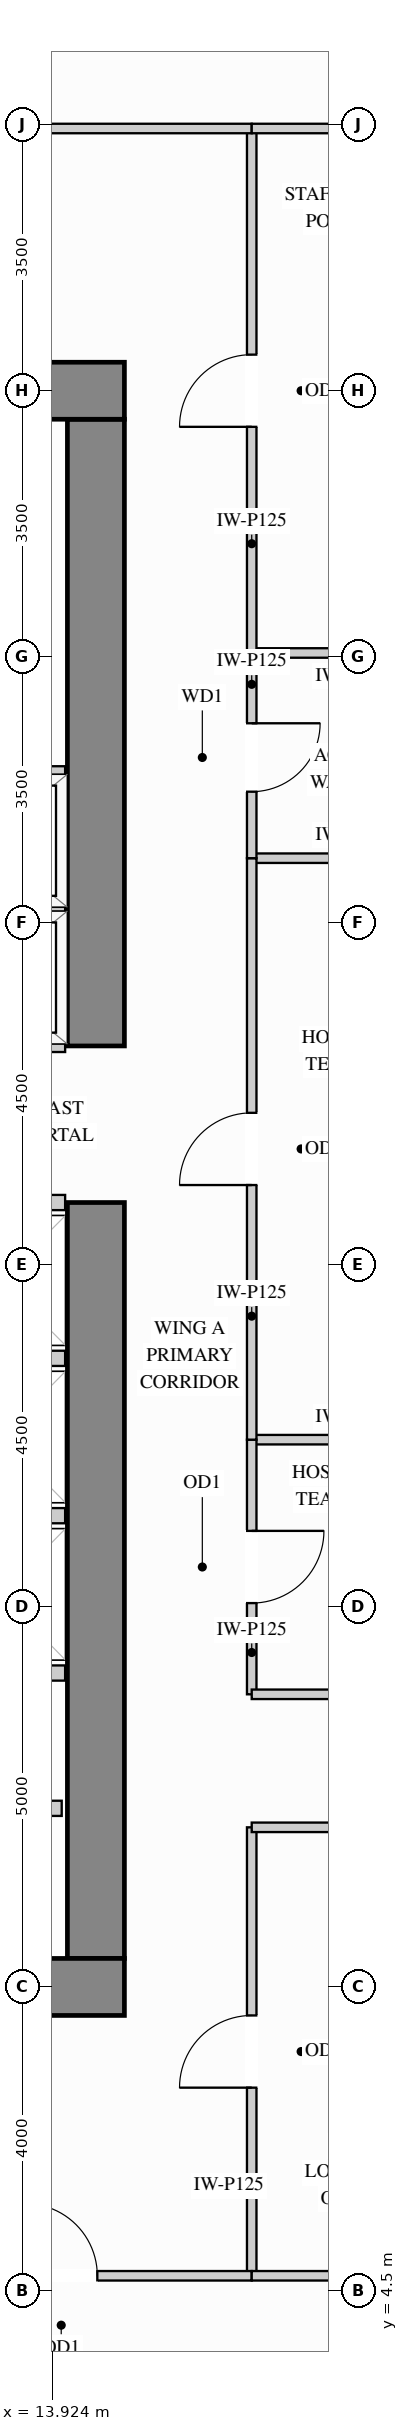
"""IFC4 building model, lengths in metres.
Left out: names, types, materials, properties, quantities, classifications, styles, units other than length and angle.
Written with IfcOpenShell. Run it as: python <this file> out.ifc"""

import sys

from ifc_helpers import new_model, si_unit, direction, frame, frame_2d, origin, place, context, subcontext, project, spatial, rectangle, extrude, source, transform, mapped, element, fill, save


model = new_model("IFC4")
c1 = context("Model", 3, precision=1e-05, world=origin(), true_north=direction((0.0, 1.0)))
c2 = subcontext(c1, "Body", "Model", "MODEL_VIEW")
j1 = project(units=[si_unit("LENGTHUNIT", "METRE"), si_unit("PLANEANGLEUNIT", "RADIAN")], contexts=[c1])
p1 = place(None, origin())
s1 = spatial("IfcSite", under=j1, at=p1, CompositionType="ELEMENT")
p2 = place(p1, origin())
s2 = spatial("IfcBuilding", under=s1, at=p2, CompositionType="ELEMENT")
p3 = place(p2, frame((0.0, 0.0, 124.2)))
s3 = spatial("IfcBuildingStorey", under=s2, at=p3, CompositionType="ELEMENT", Elevation=124.2)
m1 = source(origin(), c2, "Body", "SweptSolid", [
    extrude(rectangle(XDim=9.945, YDim=0.75, at=frame_2d((4.973, 0.0))), origin(), (0.0, 0.0, 1.0), 3.38),
])
p4 = place(p3, frame((14.5, 8.875, 0.0), z_axis=(0.0, 0.0, 1.0), x_axis=(0.0, 1.0, 0.0)))
e1 = element("IfcWall", 1, at=p4, inside=s3, PredefinedType="SHEAR", context=c2, shape_type="MappedRepresentation", body=[
    mapped(m1, transform((0.0, 0.0, 0.0), x_axis=(1.0, 0.0, 0.0), y_axis=(0.0, 1.0, 0.0), z_axis=(0.0, 0.0, 1.0))),
])
m2 = source(origin(), c2, "Body", "SweptSolid", [
    extrude(rectangle(XDim=8.245, YDim=0.75, at=frame_2d((4.123, 0.0))), origin(), (0.0, 0.0, 1.0), 3.38),
])
p5 = place(p3, frame((14.5, 20.88, 0.0), z_axis=(0.0, 0.0, 1.0), x_axis=(0.0, 1.0, 0.0)))
e2 = element("IfcWall", 2, at=p5, inside=s3, PredefinedType="SHEAR", context=c2, shape_type="MappedRepresentation", body=[
    mapped(m2, transform((0.0, 0.0, 0.0), x_axis=(1.0, 0.0, 0.0), y_axis=(0.0, 1.0, 0.0), z_axis=(0.0, 0.0, 1.0))),
])
m3 = source(origin(), c2, "Body", "SweptSolid", [
    extrude(rectangle(XDim=10.75, YDim=0.75, at=frame_2d((5.375, 0.0))), origin(), (0.0, 0.0, 1.0), 3.38),
])
for number, where, z_axis, x_axis in (
    (3, (4.125, 29.5, 0.0), (0.0, 0.0, 1.0), (1.0, 0.0, 0.0)),
    (4, (4.125, 8.5, 0.0), (0.0, 0.0, 1.0), (1.0, 0.0, 0.0)),
):
    element("IfcWall", number, at=place(p3, frame(where, z_axis=z_axis, x_axis=x_axis)), inside=s3, PredefinedType="SHEAR", context=c2, shape_type="MappedRepresentation", body=[
        mapped(m3, transform((0.0, 0.0, 0.0), x_axis=(1.0, 0.0, 0.0), y_axis=(0.0, 1.0, 0.0), z_axis=(0.0, 0.0, 1.0))),
    ])
m4 = source(origin(), c2, "Body", "SweptSolid", [
    extrude(rectangle(XDim=2.6, YDim=0.125, at=frame_2d((1.3, 0.0))), origin(), (0.0, 0.0, 1.0), 3.365),
])
p6 = place(p3, frame((16.55, 15.7, 0.0), z_axis=(0.0, 0.0, 1.0), x_axis=(1.0, 0.0, 0.0)))
e5 = element("IfcWall", 5, at=p6, inside=s3, PredefinedType="PARTITIONING", context=c2, shape_type="MappedRepresentation", body=[
    mapped(m4, transform((0.0, 0.0, 0.0), x_axis=(1.0, 0.0, 0.0), y_axis=(0.0, 1.0, 0.0), z_axis=(0.0, 0.0, 1.0))),
])
m5 = source(origin(), c2, "Body", "SweptSolid", [
    extrude(rectangle(XDim=2.598, YDim=0.125, at=frame_2d((1.299, 0.0))), origin(), (0.0, 0.0, 1.0), 3.365),
])
for number, where, z_axis, x_axis in (
    (6, (16.55, 23.35, 0.0), (0.0, 0.0, 1.0), (1.0, 0.0, 0.0)),
    (7, (16.55, 26.05, 0.0), (0.0, 0.0, 1.0), (1.0, 0.0, 0.0)),
):
    element("IfcWall", number, at=place(p3, frame(where, z_axis=z_axis, x_axis=x_axis)), inside=s3, PredefinedType="PARTITIONING", context=c2, shape_type="MappedRepresentation", body=[
        mapped(m5, transform((0.0, 0.0, 0.0), x_axis=(1.0, 0.0, 0.0), y_axis=(0.0, 1.0, 0.0), z_axis=(0.0, 0.0, 1.0))),
    ])
p7 = place(p3, frame((16.55, 12.35, 0.0), z_axis=(0.0, 0.0, 1.0), x_axis=(0.0, 1.0, 0.0)))
e8 = element("IfcWall", 8, at=p7, inside=s3, PredefinedType="PARTITIONING", context=c2, shape_type="SweptSolid", body=[
    extrude(rectangle(XDim=3.35, YDim=0.125, at=frame_2d((1.675, 0.0))), origin(), (0.0, 0.0, 1.0), 3.365),
])
p8 = place(p7, frame((1.2, 0.0, 0.0)))
e9 = element("IfcOpeningElement", 9, at=p8, cuts=e8, PredefinedType="OPENING", context=c2, shape_type="SweptSolid", body=[
    extrude(rectangle(XDim=0.95, YDim=2.15, at=frame_2d((0.475, 1.075))), frame((0.0, 0.073, 0.0), z_axis=(0.0, -1.0, 0.0), x_axis=(1.0, 0.0, 0.0)), (0.0, 0.0, 1.0), 0.145),
])
p9 = place(p3, frame((16.55, 15.7, 0.0), z_axis=(0.0, 0.0, 1.0), x_axis=(0.0, 1.0, 0.0)))
e10 = element("IfcWall", 10, at=p9, inside=s3, PredefinedType="PARTITIONING", context=c2, shape_type="SweptSolid", body=[
    extrude(rectangle(XDim=7.65, YDim=0.125, at=frame_2d((3.825, 0.0))), origin(), (0.0, 0.0, 1.0), 3.365),
])
p10 = place(p9, frame((3.35, 0.0, 0.0)))
e11 = element("IfcOpeningElement", 11, at=p10, cuts=e10, PredefinedType="OPENING", context=c2, shape_type="SweptSolid", body=[
    extrude(rectangle(XDim=0.95, YDim=2.15, at=frame_2d((0.475, 1.075))), frame((0.0, 0.073, 0.0), z_axis=(0.0, -1.0, 0.0), x_axis=(1.0, 0.0, 0.0)), (0.0, 0.0, 1.0), 0.145),
])
p11 = place(p3, frame((16.55, 26.05, 0.0), z_axis=(0.0, 0.0, 1.0), x_axis=(0.0, 1.0, 0.0)))
e12 = element("IfcWall", 12, at=p11, inside=s3, PredefinedType="PARTITIONING", context=c2, shape_type="SweptSolid", body=[
    extrude(rectangle(XDim=6.9, YDim=0.125, at=frame_2d((3.45, 0.0))), origin(), (0.0, 0.0, 1.0), 3.365),
])
p12 = place(p11, frame((2.975, 0.0, 0.0)))
e13 = element("IfcOpeningElement", 13, at=p12, cuts=e12, PredefinedType="OPENING", context=c2, shape_type="SweptSolid", body=[
    extrude(rectangle(XDim=0.95, YDim=2.15, at=frame_2d((0.475, 1.075))), frame((0.0, 0.073, 0.0), z_axis=(0.0, -1.0, 0.0), x_axis=(1.0, 0.0, 0.0)), (0.0, 0.0, 1.0), 0.145),
])
p13 = place(p3, frame((16.55, 4.7, 0.0), z_axis=(0.0, 0.0, 1.0), x_axis=(0.0, 1.0, 0.0)))
e14 = element("IfcWall", 14, at=p13, inside=s3, PredefinedType="PARTITIONING", context=c2, shape_type="SweptSolid", body=[
    extrude(rectangle(XDim=5.9, YDim=0.125, at=frame_2d((2.95, 0.0))), origin(), (0.0, 0.0, 1.0), 3.365),
])
p14 = place(p13, frame((2.475, 0.0, 0.0)))
e15 = element("IfcOpeningElement", 15, at=p14, cuts=e14, PredefinedType="OPENING", context=c2, shape_type="SweptSolid", body=[
    extrude(rectangle(XDim=0.95, YDim=2.15, at=frame_2d((0.475, 1.075))), frame((0.0, 0.073, 0.0), z_axis=(0.0, -1.0, 0.0), x_axis=(1.0, 0.0, 0.0)), (0.0, 0.0, 1.0), 0.145),
])
p15 = place(p3, frame((16.55, 23.35, 0.0), z_axis=(0.0, 0.0, 1.0), x_axis=(0.0, 1.0, 0.0)))
e16 = element("IfcWall", 16, at=p15, inside=s3, PredefinedType="PARTITIONING", context=c2, shape_type="SweptSolid", body=[
    extrude(rectangle(XDim=2.7, YDim=0.125, at=frame_2d((1.35, 0.0))), origin(), (0.0, 0.0, 1.0), 3.365),
])
p16 = place(p15, frame((0.875, 0.0, 0.0)))
e17 = element("IfcOpeningElement", 17, at=p16, cuts=e16, PredefinedType="OPENING", context=c2, shape_type="SweptSolid", body=[
    extrude(rectangle(XDim=0.9, YDim=2.15, at=frame_2d((0.45, 1.075))), frame((0.0, 0.073, 0.0), z_axis=(0.0, -1.0, 0.0), x_axis=(1.0, 0.0, 0.0)), (0.0, 0.0, 1.0), 0.145),
])
p17 = place(p3, frame((2.45, 32.95, 0.0), z_axis=(0.0, 0.0, 1.0), x_axis=(1.0, 0.0, 0.0)))
e18 = element("IfcWall", 18, at=p17, inside=s3, PredefinedType="PARTITIONING", context=c2, shape_type="SweptSolid", body=[
    extrude(rectangle(XDim=14.1, YDim=0.125, at=frame_2d((7.05, 0.0))), origin(), (0.0, 0.0, 1.0), 3.365),
])
p18 = place(p17, frame((6.575, 0.0, 0.0)))
e19 = element("IfcOpeningElement", 19, at=p18, cuts=e18, PredefinedType="OPENING", context=c2, shape_type="SweptSolid", body=[
    extrude(rectangle(XDim=0.95, YDim=2.15, at=frame_2d((0.475, 1.075))), frame((0.0, 0.073, 0.0), z_axis=(0.0, -1.0, 0.0), x_axis=(1.0, 0.0, 0.0)), (0.0, 0.0, 1.0), 0.145),
])
p19 = place(p3, frame((16.55, 32.95, 0.0), z_axis=(0.0, 0.0, 1.0), x_axis=(1.0, 0.0, 0.0)))
e20 = element("IfcWall", 20, at=p19, inside=s3, PredefinedType="PARTITIONING", context=c2, shape_type="MappedRepresentation", body=[
    mapped(m5, transform((0.0, 0.0, 0.0), x_axis=(1.0, 0.0, 0.0), y_axis=(0.0, 1.0, 0.0), z_axis=(0.0, 0.0, 1.0))),
])
m6 = source(origin(), c2, "Body", "SweptSolid", [
    extrude(rectangle(XDim=2.95, YDim=0.125, at=frame_2d((1.475, 0.0))), origin(), (0.0, 0.0, 1.0), 3.365),
])
for number, where, z_axis, x_axis in (
    (21, (16.55, 12.35, 0.0), (0.0, 0.0, 1.0), (1.0, 0.0, 0.0)),
    (22, (16.55, 10.6, 0.0), (0.0, 0.0, 1.0), (1.0, 0.0, 0.0)),
):
    element("IfcWall", number, at=place(p3, frame(where, z_axis=z_axis, x_axis=x_axis)), inside=s3, PredefinedType="PARTITIONING", context=c2, shape_type="MappedRepresentation", body=[
        mapped(m6, transform((0.0, 0.0, 0.0), x_axis=(1.0, 0.0, 0.0), y_axis=(0.0, 1.0, 0.0), z_axis=(0.0, 0.0, 1.0))),
    ])
p20 = place(p3, frame((11.537, 4.7, 0.0), z_axis=(0.0, 0.0, 1.0), x_axis=(1.0, 0.0, 0.0)))
e23 = element("IfcWall", 23, at=p20, inside=s3, PredefinedType="PARTITIONING", context=c2, shape_type="SweptSolid", body=[
    extrude(rectangle(XDim=5.013, YDim=0.125, at=frame_2d((2.506, 0.0))), origin(), (0.0, 0.0, 1.0), 2.828),
])
p21 = place(p20, frame((2.031, 0.0, 0.0)))
e24 = element("IfcOpeningElement", 24, at=p21, cuts=e23, PredefinedType="OPENING", context=c2, shape_type="SweptSolid", body=[
    extrude(rectangle(XDim=0.95, YDim=2.15, at=frame_2d((0.475, 1.075))), frame((0.0, 0.073, 0.0), z_axis=(0.0, -1.0, 0.0), x_axis=(1.0, 0.0, 0.0)), (0.0, 0.0, 1.0), 0.145),
])
m7 = source(origin(), c2, "Body", "SweptSolid", [
    extrude(rectangle(XDim=2.598, YDim=0.125, at=frame_2d((1.299, 0.0))), origin(), (0.0, 0.0, 1.0), 2.828),
])
p22 = place(p3, frame((16.55, 4.7, 0.0), z_axis=(0.0, 0.0, 1.0), x_axis=(1.0, 0.0, 0.0)))
e25 = element("IfcWall", 25, at=p22, inside=s3, PredefinedType="PARTITIONING", context=c2, shape_type="MappedRepresentation", body=[
    mapped(m7, transform((0.0, 0.0, 0.0), x_axis=(1.0, 0.0, 0.0), y_axis=(0.0, 1.0, 0.0), z_axis=(0.0, 0.0, 1.0))),
])
m8 = source(origin(), c2, "Body", "SweptSolid", [
    extrude(rectangle(XDim=1.63, YDim=0.2, at=frame_2d((0.815, 0.0))), origin(), (0.0, 0.0, 1.0), 3.365),
])
p23 = place(p3, frame((12.42, 10.85, 0.0), z_axis=(0.0, 0.0, 1.0), x_axis=(1.0, 0.0, 0.0)))
e26 = element("IfcWall", 26, at=p23, inside=s3, PredefinedType="PARTITIONING", context=c2, shape_type="MappedRepresentation", body=[
    mapped(m8, transform((0.0, 0.0, 0.0), x_axis=(1.0, 0.0, 0.0), y_axis=(0.0, 1.0, 0.0), z_axis=(0.0, 0.0, 1.0))),
])
m9 = source(origin(), c2, "Body", "SweptSolid", [
    extrude(rectangle(XDim=2.265, YDim=0.2, at=frame_2d((1.132, 0.0))), origin(), (0.0, 0.0, 1.0), 3.365),
])
for number, where, z_axis, x_axis in (
    (27, (11.83, 22.66, 0.0), (0.0, 0.0, 1.0), (1.0, 0.0, 0.0)),
    (28, (11.83, 20.9, 0.0), (0.0, 0.0, 1.0), (1.0, 0.0, 0.0)),
    (29, (11.83, 24.46, 0.0), (0.0, 0.0, 1.0), (1.0, 0.0, 0.0)),
):
    element("IfcWall", number, at=place(p3, frame(where, z_axis=z_axis, x_axis=x_axis)), inside=s3, PredefinedType="PARTITIONING", context=c2, shape_type="MappedRepresentation", body=[
        mapped(m9, transform((0.0, 0.0, 0.0), x_axis=(1.0, 0.0, 0.0), y_axis=(0.0, 1.0, 0.0), z_axis=(0.0, 0.0, 1.0))),
    ])
m10 = source(origin(), c2, "Body", "SweptSolid", [
    extrude(rectangle(XDim=1.865, YDim=0.2, at=frame_2d((0.933, 0.0))), origin(), (0.0, 0.0, 1.0), 3.365),
])
for number, where, z_axis, x_axis in (
    (30, (12.23, 14.7, 0.0), (0.0, 0.0, 1.0), (1.0, 0.0, 0.0)),
    (31, (12.23, 12.63, 0.0), (0.0, 0.0, 1.0), (1.0, 0.0, 0.0)),
    (32, (12.23, 16.77, 0.0), (0.0, 0.0, 1.0), (1.0, 0.0, 0.0)),
    (33, (12.23, 18.82, 0.0), (0.0, 0.0, 1.0), (1.0, 0.0, 0.0)),
):
    element("IfcWall", number, at=place(p3, frame(where, z_axis=z_axis, x_axis=x_axis)), inside=s3, PredefinedType="PARTITIONING", context=c2, shape_type="MappedRepresentation", body=[
        mapped(m10, transform((0.0, 0.0, 0.0), x_axis=(1.0, 0.0, 0.0), y_axis=(0.0, 1.0, 0.0), z_axis=(0.0, 0.0, 1.0))),
    ])
m11 = source(origin(), c2, "Body", "SweptSolid", [
    extrude(rectangle(XDim=0.95, YDim=2.15, at=frame_2d((0.475, 1.075))), frame((0.0, 0.025, 0.0), z_axis=(0.0, -1.0, 0.0), x_axis=(1.0, 0.0, 0.0)), (0.0, 0.0, 1.0), 0.05),
])
p24 = place(p14, origin())
e34 = element("IfcDoor", 34, at=p24, inside=s3, OperationType="SINGLE_SWING_LEFT", PredefinedType="DOOR", context=c2, shape_type="MappedRepresentation", body=[
    mapped(m11, transform((0.0, 0.0, 0.0), x_axis=(1.0, 0.0, 0.0), y_axis=(0.0, 1.0, 0.0), z_axis=(0.0, 0.0, 1.0))),
])
fill(e15, e34)
p25 = place(p8, origin())
e35 = element("IfcDoor", 35, at=p25, inside=s3, OperationType="SINGLE_SWING_RIGHT", PredefinedType="DOOR", context=c2, shape_type="MappedRepresentation", body=[
    mapped(m11, transform((0.0, 0.0, 0.0), x_axis=(1.0, 0.0, 0.0), y_axis=(0.0, 1.0, 0.0), z_axis=(0.0, 0.0, 1.0))),
])
fill(e9, e35)
p26 = place(p10, origin())
e36 = element("IfcDoor", 36, at=p26, inside=s3, OperationType="SINGLE_SWING_LEFT", PredefinedType="DOOR", context=c2, shape_type="MappedRepresentation", body=[
    mapped(m11, transform((0.0, 0.0, 0.0), x_axis=(1.0, 0.0, 0.0), y_axis=(0.0, 1.0, 0.0), z_axis=(0.0, 0.0, 1.0))),
])
fill(e11, e36)
p27 = place(p12, origin())
e37 = element("IfcDoor", 37, at=p27, inside=s3, OperationType="SINGLE_SWING_LEFT", PredefinedType="DOOR", context=c2, shape_type="MappedRepresentation", body=[
    mapped(m11, transform((0.0, 0.0, 0.0), x_axis=(1.0, 0.0, 0.0), y_axis=(0.0, 1.0, 0.0), z_axis=(0.0, 0.0, 1.0))),
])
fill(e13, e37)
p28 = place(p21, origin())
e38 = element("IfcDoor", 38, at=p28, inside=s3, OperationType="SINGLE_SWING_LEFT", PredefinedType="DOOR", context=c2, shape_type="MappedRepresentation", body=[
    mapped(m11, transform((0.0, 0.0, 0.0), x_axis=(1.0, 0.0, 0.0), y_axis=(0.0, 1.0, 0.0), z_axis=(0.0, 0.0, 1.0))),
])
fill(e24, e38)
m12 = source(origin(), c2, "Body", "SweptSolid", [
    extrude(rectangle(XDim=0.9, YDim=2.15, at=frame_2d((0.45, 1.075))), frame((0.0, 0.025, 0.0), z_axis=(0.0, -1.0, 0.0), x_axis=(1.0, 0.0, 0.0)), (0.0, 0.0, 1.0), 0.05),
])
p29 = place(p16, origin())
e39 = element("IfcDoor", 39, at=p29, inside=s3, OperationType="SINGLE_SWING_RIGHT", PredefinedType="DOOR", context=c2, shape_type="MappedRepresentation", body=[
    mapped(m12, transform((0.0, 0.0, 0.0), x_axis=(1.0, 0.0, 0.0), y_axis=(0.0, 1.0, 0.0), z_axis=(0.0, 0.0, 1.0))),
])
fill(e17, e39)
save(model, sys.argv[1])
